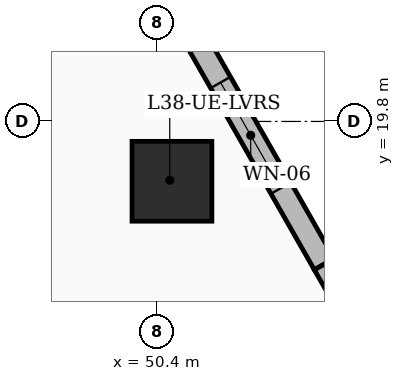
"""IFC4 building model, lengths in metres.
Left out: names, types, materials, properties, quantities, classifications, styles, units other than length and angle.
Written with IfcOpenShell. Run it as: python <this file> out.ifc"""

import sys

from ifc_helpers import new_model, si_unit, direction, frame, frame_2d, origin, origin_2d, place, context, subcontext, project, spatial, rectangle, extrude, element, fill, save


model = new_model("IFC4")
c1 = context("Model", 3, precision=1e-05, world=origin(), true_north=direction((0.0, 1.0)))
c2 = subcontext(c1, "Body", "Model", "MODEL_VIEW")
j1 = project(units=[si_unit("LENGTHUNIT", "METRE"), si_unit("PLANEANGLEUNIT", "RADIAN")], contexts=[c1])
p1 = place(None, origin())
s1 = spatial("IfcSite", under=j1, at=p1, CompositionType="ELEMENT")
p2 = place(p1, origin())
s2 = spatial("IfcBuilding", under=s1, at=p2, CompositionType="ELEMENT")
p3 = place(p2, frame((0.0, 0.0, 150.0)))
s3 = spatial("IfcBuildingStorey", under=s2, at=p3, CompositionType="ELEMENT", Elevation=150.0)
p4 = place(p3, frame((50.594, 19.013, 0.0), z_axis=(0.0, 0.0, 1.0), x_axis=(1.0, 0.0, 0.0)))
e1 = element("IfcColumn", 1, at=p4, inside=s3, PredefinedType="COLUMN", context=c2, shape_type="SweptSolid", body=[
    extrude(rectangle(XDim=1.05, YDim=1.05, at=origin_2d()), origin(), (0.0, 0.0, 1.0), 3.6),
])
p5 = place(p3, frame((49.09, 24.069, 0.0), z_axis=(0.0, 0.0, 1.0), x_axis=(0.495704199243, -0.868491420137, 0.0)))
e2 = element("IfcWall", 2, at=p5, inside=s3, PredefinedType="SOLIDWALL", context=c2, shape_type="SweptSolid", body=[
    extrude(rectangle(XDim=7.077, YDim=0.3, at=frame_2d((3.539, 0.0))), origin(), (0.0, 0.0, 1.0), 3.35),
])
p6 = place(p5, frame((4.325, 0.0, 0.55)))
e3 = element("IfcOpeningElement", 3, at=p6, cuts=e2, PredefinedType="OPENING", context=c2, shape_type="SweptSolid", body=[
    extrude(rectangle(XDim=1.6, YDim=2.2, at=frame_2d((0.8, 1.1))), frame((0.0, 0.16, 0.0), z_axis=(0.0, -1.0, 0.0), x_axis=(1.0, 0.0, 0.0)), (0.0, 0.0, 1.0), 0.32),
])
p7 = place(p5, frame((0.95, 0.0, 0.55)))
e4 = element("IfcOpeningElement", 4, at=p7, cuts=e2, PredefinedType="OPENING", context=c2, shape_type="SweptSolid", body=[
    extrude(rectangle(XDim=1.6, YDim=2.2, at=frame_2d((0.8, 1.1))), frame((0.0, 0.16, 0.0), z_axis=(0.0, -1.0, 0.0), x_axis=(1.0, 0.0, 0.0)), (0.0, 0.0, 1.0), 0.32),
])
p8 = place(p3, frame((52.598, 17.923, 0.0), z_axis=(0.0, 0.0, 1.0), x_axis=(0.495698993586, -0.868494391322, 0.0)))
e5 = element("IfcWall", 5, at=p8, inside=s3, PredefinedType="SOLIDWALL", context=c2, shape_type="SweptSolid", body=[
    extrude(rectangle(XDim=7.352, YDim=0.3, at=frame_2d((3.676, 0.0))), origin(), (0.0, 0.0, 1.0), 3.35),
])
p9 = place(p8, frame((1.025, 0.0, 0.6)))
e6 = element("IfcOpeningElement", 6, at=p9, cuts=e5, PredefinedType="OPENING", context=c2, shape_type="SweptSolid", body=[
    extrude(rectangle(XDim=1.5, YDim=2.1, at=frame_2d((0.75, 1.05))), frame((0.0, 0.16, 0.0), z_axis=(0.0, -1.0, 0.0), x_axis=(1.0, 0.0, 0.0)), (0.0, 0.0, 1.0), 0.32),
])
p10 = place(p8, frame((4.4, 0.0, 0.6)))
e7 = element("IfcOpeningElement", 7, at=p10, cuts=e5, PredefinedType="OPENING", context=c2, shape_type="SweptSolid", body=[
    extrude(rectangle(XDim=1.5, YDim=2.1, at=frame_2d((0.75, 1.05))), frame((0.0, 0.16, 0.0), z_axis=(0.0, -1.0, 0.0), x_axis=(1.0, 0.0, 0.0)), (0.0, 0.0, 1.0), 0.32),
])
p11 = place(p6, origin())
e8 = element("IfcWindow", 8, at=p11, inside=s3, PartitioningType="SINGLE_PANEL", PredefinedType="WINDOW", context=c2, shape_type="SweptSolid", body=[
    extrude(rectangle(XDim=1.6, YDim=2.2, at=frame_2d((0.8, 1.1))), frame((0.0, 0.03, 0.0), z_axis=(0.0, -1.0, 0.0), x_axis=(1.0, 0.0, 0.0)), (0.0, 0.0, 1.0), 0.06),
])
fill(e3, e8)
save(model, sys.argv[1])
